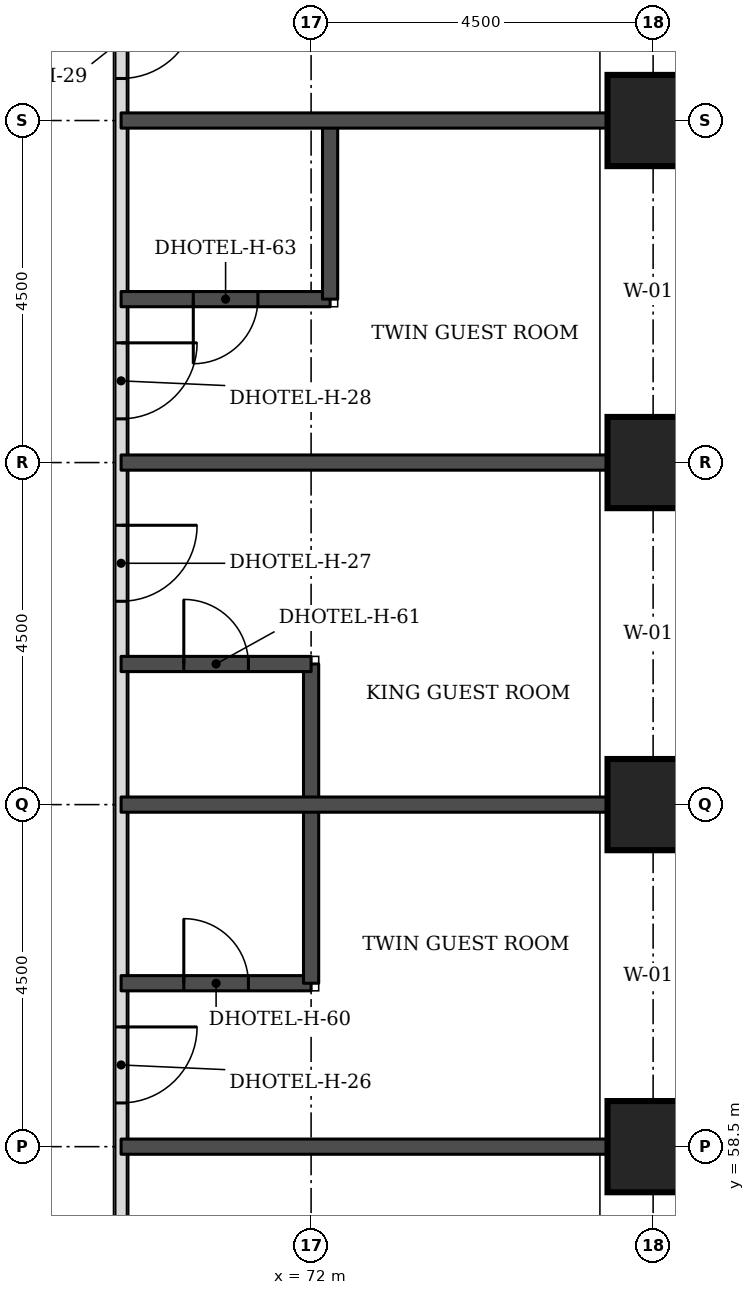
"""IFC4 building model, lengths in metres.
Left out: names, types, materials, properties, quantities, classifications, styles, units other than length and angle.
Written with IfcOpenShell. Run it as: python <this file> out.ifc"""

import sys

from ifc_helpers import new_model, si_unit, direction, frame, frame_2d, origin, origin_2d, place, context, subcontext, project, spatial, rectangle, extrude, element, fill, save


model = new_model("IFC4")
c1 = context("Model", 3, precision=1e-05, world=origin(), true_north=direction((0.0, 1.0)))
c2 = subcontext(c1, "Body", "Model", "MODEL_VIEW")
j1 = project(units=[si_unit("LENGTHUNIT", "METRE"), si_unit("PLANEANGLEUNIT", "RADIAN")], contexts=[c1])
p1 = place(None, origin())
s1 = spatial("IfcSite", under=j1, at=p1, CompositionType="ELEMENT")
p2 = place(p1, origin())
s2 = spatial("IfcBuilding", under=s1, at=p2, CompositionType="ELEMENT")
p3 = place(p2, frame((0.0, 0.0, 46.2)))
s3 = spatial("IfcBuildingStorey", under=s2, at=p3, CompositionType="ELEMENT", Elevation=46.2)
for number, where, z_axis, x_axis in (
    (1, (76.5, 58.5, 0.0), (0.0, 0.0, 1.0), (1.0, 0.0, 0.0)),
    (2, (76.5, 63.0, 0.0), (0.0, 0.0, 1.0), (1.0, 0.0, 0.0)),
    (3, (76.5, 67.5, 0.0), (0.0, 0.0, 1.0), (1.0, 0.0, 0.0)),
    (4, (76.5, 72.0, 0.0), (0.0, 0.0, 1.0), (1.0, 0.0, 0.0)),
):
    element("IfcColumn", number, at=place(p3, frame(where, z_axis=z_axis, x_axis=x_axis)), inside=s3, PredefinedType="COLUMN", context=c2, shape_type="SweptSolid", body=[
        extrude(rectangle(XDim=1.2, YDim=1.2, at=origin_2d()), origin(), (0.0, 0.0, 1.0), 3.3),
    ])
p4 = place(p3, frame((69.5, 47.5, 0.0), z_axis=(0.0, 0.0, 1.0), x_axis=(0.0, 1.0, 0.0)))
e5 = element("IfcWall", 5, at=p4, inside=s3, PredefinedType="PARTITIONING", context=c2, shape_type="SweptSolid", body=[
    extrude(rectangle(XDim=26.5, YDim=0.15, at=frame_2d((13.25, 0.0))), origin(), (0.0, 0.0, 1.0), 3.08),
])
p5 = place(p4, frame((25.053, 0.0, 0.0)))
e6 = element("IfcOpeningElement", 6, at=p5, cuts=e5, PredefinedType="OPENING", context=c2, shape_type="SweptSolid", body=[
    extrude(rectangle(XDim=1.0, YDim=2.1, at=frame_2d((0.5, 1.05))), frame((0.0, 0.085, 0.0), z_axis=(0.0, -1.0, 0.0), x_axis=(1.0, 0.0, 0.0)), (0.0, 0.0, 1.0), 0.17),
])
p6 = place(p4, frame((20.575, 0.0, 0.0)))
e7 = element("IfcOpeningElement", 7, at=p6, cuts=e5, PredefinedType="OPENING", context=c2, shape_type="SweptSolid", body=[
    extrude(rectangle(XDim=1.0, YDim=2.1, at=frame_2d((0.5, 1.05))), frame((0.0, 0.085, 0.0), z_axis=(0.0, -1.0, 0.0), x_axis=(1.0, 0.0, 0.0)), (0.0, 0.0, 1.0), 0.17),
])
p7 = place(p4, frame((18.175, 0.0, 0.0)))
e8 = element("IfcOpeningElement", 8, at=p7, cuts=e5, PredefinedType="OPENING", context=c2, shape_type="SweptSolid", body=[
    extrude(rectangle(XDim=1.0, YDim=2.1, at=frame_2d((0.5, 1.05))), frame((0.0, 0.085, 0.0), z_axis=(0.0, -1.0, 0.0), x_axis=(1.0, 0.0, 0.0)), (0.0, 0.0, 1.0), 0.17),
])
p8 = place(p4, frame((11.575, 0.0, 0.0)))
e9 = element("IfcOpeningElement", 9, at=p8, cuts=e5, PredefinedType="OPENING", context=c2, shape_type="SweptSolid", body=[
    extrude(rectangle(XDim=1.0, YDim=2.1, at=frame_2d((0.5, 1.05))), frame((0.0, 0.085, 0.0), z_axis=(0.0, -1.0, 0.0), x_axis=(1.0, 0.0, 0.0)), (0.0, 0.0, 1.0), 0.17),
])
p9 = place(p4, frame((7.65, 0.0, 0.0)))
e10 = element("IfcOpeningElement", 10, at=p9, cuts=e5, PredefinedType="OPENING", context=c2, shape_type="SweptSolid", body=[
    extrude(rectangle(XDim=1.1, YDim=2.1, at=frame_2d((0.55, 1.05))), frame((0.0, 0.085, 0.0), z_axis=(0.0, -1.0, 0.0), x_axis=(1.0, 0.0, 0.0)), (0.0, 0.0, 1.0), 0.17),
])
p10 = place(p4, frame((0.447, 0.0, 0.0)))
e11 = element("IfcOpeningElement", 11, at=p10, cuts=e5, PredefinedType="OPENING", context=c2, shape_type="SweptSolid", body=[
    extrude(rectangle(XDim=1.0, YDim=2.1, at=frame_2d((0.5, 1.05))), frame((0.0, 0.085, 0.0), z_axis=(0.0, -1.0, 0.0), x_axis=(1.0, 0.0, 0.0)), (0.0, 0.0, 1.0), 0.17),
])
p11 = place(p3, frame((69.5, 58.5, 0.0), z_axis=(0.0, 0.0, 1.0), x_axis=(1.0, 0.0, 0.0)))
e12 = element("IfcWall", 12, at=p11, inside=s3, PredefinedType="SOLIDWALL", context=c2, shape_type="SweptSolid", body=[
    extrude(rectangle(XDim=6.4, YDim=0.2, at=frame_2d((3.2, 0.0))), origin(), (0.0, 0.0, 1.0), 3.08),
])
p12 = place(p3, frame((69.5, 60.65, 0.0), z_axis=(0.0, 0.0, 1.0), x_axis=(1.0, 0.0, 0.0)))
e13 = element("IfcWall", 13, at=p12, inside=s3, PredefinedType="SOLIDWALL", context=c2, shape_type="SweptSolid", body=[
    extrude(rectangle(XDim=2.5, YDim=0.2, at=frame_2d((1.25, 0.0))), origin(), (0.0, 0.0, 1.0), 3.08),
])
p13 = place(p12, frame((0.825, 0.0, 0.0)))
e14 = element("IfcOpeningElement", 14, at=p13, cuts=e13, PredefinedType="OPENING", context=c2, shape_type="SweptSolid", body=[
    extrude(rectangle(XDim=0.85, YDim=2.1, at=frame_2d((0.425, 1.05))), frame((0.0, 0.11, 0.0), z_axis=(0.0, -1.0, 0.0), x_axis=(1.0, 0.0, 0.0)), (0.0, 0.0, 1.0), 0.22),
])
p14 = place(p3, frame((72.0, 60.65, 0.0), z_axis=(0.0, 0.0, 1.0), x_axis=(0.0, 1.0, 0.0)))
e15 = element("IfcWall", 15, at=p14, inside=s3, PredefinedType="SOLIDWALL", context=c2, shape_type="SweptSolid", body=[
    extrude(rectangle(XDim=4.2, YDim=0.2, at=frame_2d((2.1, 0.0))), origin(), (0.0, 0.0, 1.0), 3.08),
])
p15 = place(p3, frame((69.5, 63.0, 0.0), z_axis=(0.0, 0.0, 1.0), x_axis=(1.0, 0.0, 0.0)))
e16 = element("IfcWall", 16, at=p15, inside=s3, PredefinedType="SOLIDWALL", context=c2, shape_type="SweptSolid", body=[
    extrude(rectangle(XDim=6.4, YDim=0.2, at=frame_2d((3.2, 0.0))), origin(), (0.0, 0.0, 1.0), 3.08),
])
p16 = place(p3, frame((69.5, 64.85, 0.0), z_axis=(0.0, 0.0, 1.0), x_axis=(1.0, 0.0, 0.0)))
e17 = element("IfcWall", 17, at=p16, inside=s3, PredefinedType="SOLIDWALL", context=c2, shape_type="SweptSolid", body=[
    extrude(rectangle(XDim=2.5, YDim=0.2, at=frame_2d((1.25, 0.0))), origin(), (0.0, 0.0, 1.0), 3.08),
])
p17 = place(p16, frame((0.825, 0.0, 0.0)))
e18 = element("IfcOpeningElement", 18, at=p17, cuts=e17, PredefinedType="OPENING", context=c2, shape_type="SweptSolid", body=[
    extrude(rectangle(XDim=0.85, YDim=2.1, at=frame_2d((0.425, 1.05))), frame((0.0, 0.11, 0.0), z_axis=(0.0, -1.0, 0.0), x_axis=(1.0, 0.0, 0.0)), (0.0, 0.0, 1.0), 0.22),
])
p18 = place(p3, frame((69.5, 67.5, 0.0), z_axis=(0.0, 0.0, 1.0), x_axis=(1.0, 0.0, 0.0)))
e19 = element("IfcWall", 19, at=p18, inside=s3, PredefinedType="SOLIDWALL", context=c2, shape_type="SweptSolid", body=[
    extrude(rectangle(XDim=6.4, YDim=0.2, at=frame_2d((3.2, 0.0))), origin(), (0.0, 0.0, 1.0), 3.08),
])
p19 = place(p3, frame((69.5, 69.65, 0.0), z_axis=(0.0, 0.0, 1.0), x_axis=(1.0, 0.0, 0.0)))
e20 = element("IfcWall", 20, at=p19, inside=s3, PredefinedType="SOLIDWALL", context=c2, shape_type="SweptSolid", body=[
    extrude(rectangle(XDim=2.75, YDim=0.2, at=frame_2d((1.375, 0.0))), origin(), (0.0, 0.0, 1.0), 3.08),
])
p20 = place(p19, frame((0.95, 0.0, 0.0)))
e21 = element("IfcOpeningElement", 21, at=p20, cuts=e20, PredefinedType="OPENING", context=c2, shape_type="SweptSolid", body=[
    extrude(rectangle(XDim=0.85, YDim=2.1, at=frame_2d((0.425, 1.05))), frame((0.0, 0.11, 0.0), z_axis=(0.0, -1.0, 0.0), x_axis=(1.0, 0.0, 0.0)), (0.0, 0.0, 1.0), 0.22),
])
p21 = place(p3, frame((72.25, 69.65, 0.0), z_axis=(0.0, 0.0, 1.0), x_axis=(0.0, 1.0, 0.0)))
e22 = element("IfcWall", 22, at=p21, inside=s3, PredefinedType="SOLIDWALL", context=c2, shape_type="SweptSolid", body=[
    extrude(rectangle(XDim=2.35, YDim=0.2, at=frame_2d((1.175, 0.0))), origin(), (0.0, 0.0, 1.0), 3.08),
])
p22 = place(p3, frame((69.5, 72.0, 0.0), z_axis=(0.0, 0.0, 1.0), x_axis=(1.0, 0.0, 0.0)))
e23 = element("IfcWall", 23, at=p22, inside=s3, PredefinedType="SOLIDWALL", context=c2, shape_type="SweptSolid", body=[
    extrude(rectangle(XDim=6.4, YDim=0.2, at=frame_2d((3.2, 0.0))), origin(), (0.0, 0.0, 1.0), 3.08),
])
p23 = place(p5, frame((1.0, 0.0, 0.0), z_axis=(0.0, 0.0, 1.0), x_axis=(-1.0, 0.0, 0.0)))
e24 = element("IfcDoor", 24, at=p23, inside=s3, OperationType="SINGLE_SWING_LEFT", PredefinedType="DOOR", context=c2, shape_type="SweptSolid", body=[
    extrude(rectangle(XDim=1.0, YDim=2.1, at=frame_2d((0.5, 1.05))), frame((0.0, 0.025, 0.0), z_axis=(0.0, -1.0, 0.0), x_axis=(1.0, 0.0, 0.0)), (0.0, 0.0, 1.0), 0.05),
])
fill(e6, e24)
p24 = place(p6, frame((1.0, 0.0, 0.0), z_axis=(0.0, 0.0, 1.0), x_axis=(-1.0, 0.0, 0.0)))
e25 = element("IfcDoor", 25, at=p24, inside=s3, OperationType="SINGLE_SWING_LEFT", PredefinedType="DOOR", context=c2, shape_type="SweptSolid", body=[
    extrude(rectangle(XDim=1.0, YDim=2.1, at=frame_2d((0.5, 1.05))), frame((0.0, 0.025, 0.0), z_axis=(0.0, -1.0, 0.0), x_axis=(1.0, 0.0, 0.0)), (0.0, 0.0, 1.0), 0.05),
])
fill(e7, e25)
p25 = place(p20, frame((0.85, 0.0, 0.0), z_axis=(0.0, 0.0, 1.0), x_axis=(-1.0, 0.0, 0.0)))
e26 = element("IfcDoor", 26, at=p25, inside=s3, OperationType="SINGLE_SWING_RIGHT", PredefinedType="DOOR", context=c2, shape_type="SweptSolid", body=[
    extrude(rectangle(XDim=0.85, YDim=2.1, at=frame_2d((0.425, 1.05))), frame((0.0, 0.025, 0.0), z_axis=(0.0, -1.0, 0.0), x_axis=(1.0, 0.0, 0.0)), (0.0, 0.0, 1.0), 0.05),
])
fill(e21, e26)
p26 = place(p7, frame((1.0, 0.0, 0.0), z_axis=(0.0, 0.0, 1.0), x_axis=(-1.0, 0.0, 0.0)))
e27 = element("IfcDoor", 27, at=p26, inside=s3, OperationType="SINGLE_SWING_LEFT", PredefinedType="DOOR", context=c2, shape_type="SweptSolid", body=[
    extrude(rectangle(XDim=1.0, YDim=2.1, at=frame_2d((0.5, 1.05))), frame((0.0, 0.025, 0.0), z_axis=(0.0, -1.0, 0.0), x_axis=(1.0, 0.0, 0.0)), (0.0, 0.0, 1.0), 0.05),
])
fill(e8, e27)
p27 = place(p17, origin())
e28 = element("IfcDoor", 28, at=p27, inside=s3, OperationType="SINGLE_SWING_LEFT", PredefinedType="DOOR", context=c2, shape_type="SweptSolid", body=[
    extrude(rectangle(XDim=0.85, YDim=2.1, at=frame_2d((0.425, 1.05))), frame((0.0, 0.025, 0.0), z_axis=(0.0, -1.0, 0.0), x_axis=(1.0, 0.0, 0.0)), (0.0, 0.0, 1.0), 0.05),
])
fill(e18, e28)
p28 = place(p8, frame((1.0, 0.0, 0.0), z_axis=(0.0, 0.0, 1.0), x_axis=(-1.0, 0.0, 0.0)))
e29 = element("IfcDoor", 29, at=p28, inside=s3, OperationType="SINGLE_SWING_LEFT", PredefinedType="DOOR", context=c2, shape_type="SweptSolid", body=[
    extrude(rectangle(XDim=1.0, YDim=2.1, at=frame_2d((0.5, 1.05))), frame((0.0, 0.025, 0.0), z_axis=(0.0, -1.0, 0.0), x_axis=(1.0, 0.0, 0.0)), (0.0, 0.0, 1.0), 0.05),
])
fill(e9, e29)
p29 = place(p13, origin())
e30 = element("IfcDoor", 30, at=p29, inside=s3, OperationType="SINGLE_SWING_LEFT", PredefinedType="DOOR", context=c2, shape_type="SweptSolid", body=[
    extrude(rectangle(XDim=0.85, YDim=2.1, at=frame_2d((0.425, 1.05))), frame((0.0, 0.025, 0.0), z_axis=(0.0, -1.0, 0.0), x_axis=(1.0, 0.0, 0.0)), (0.0, 0.0, 1.0), 0.05),
])
fill(e14, e30)
save(model, sys.argv[1])
